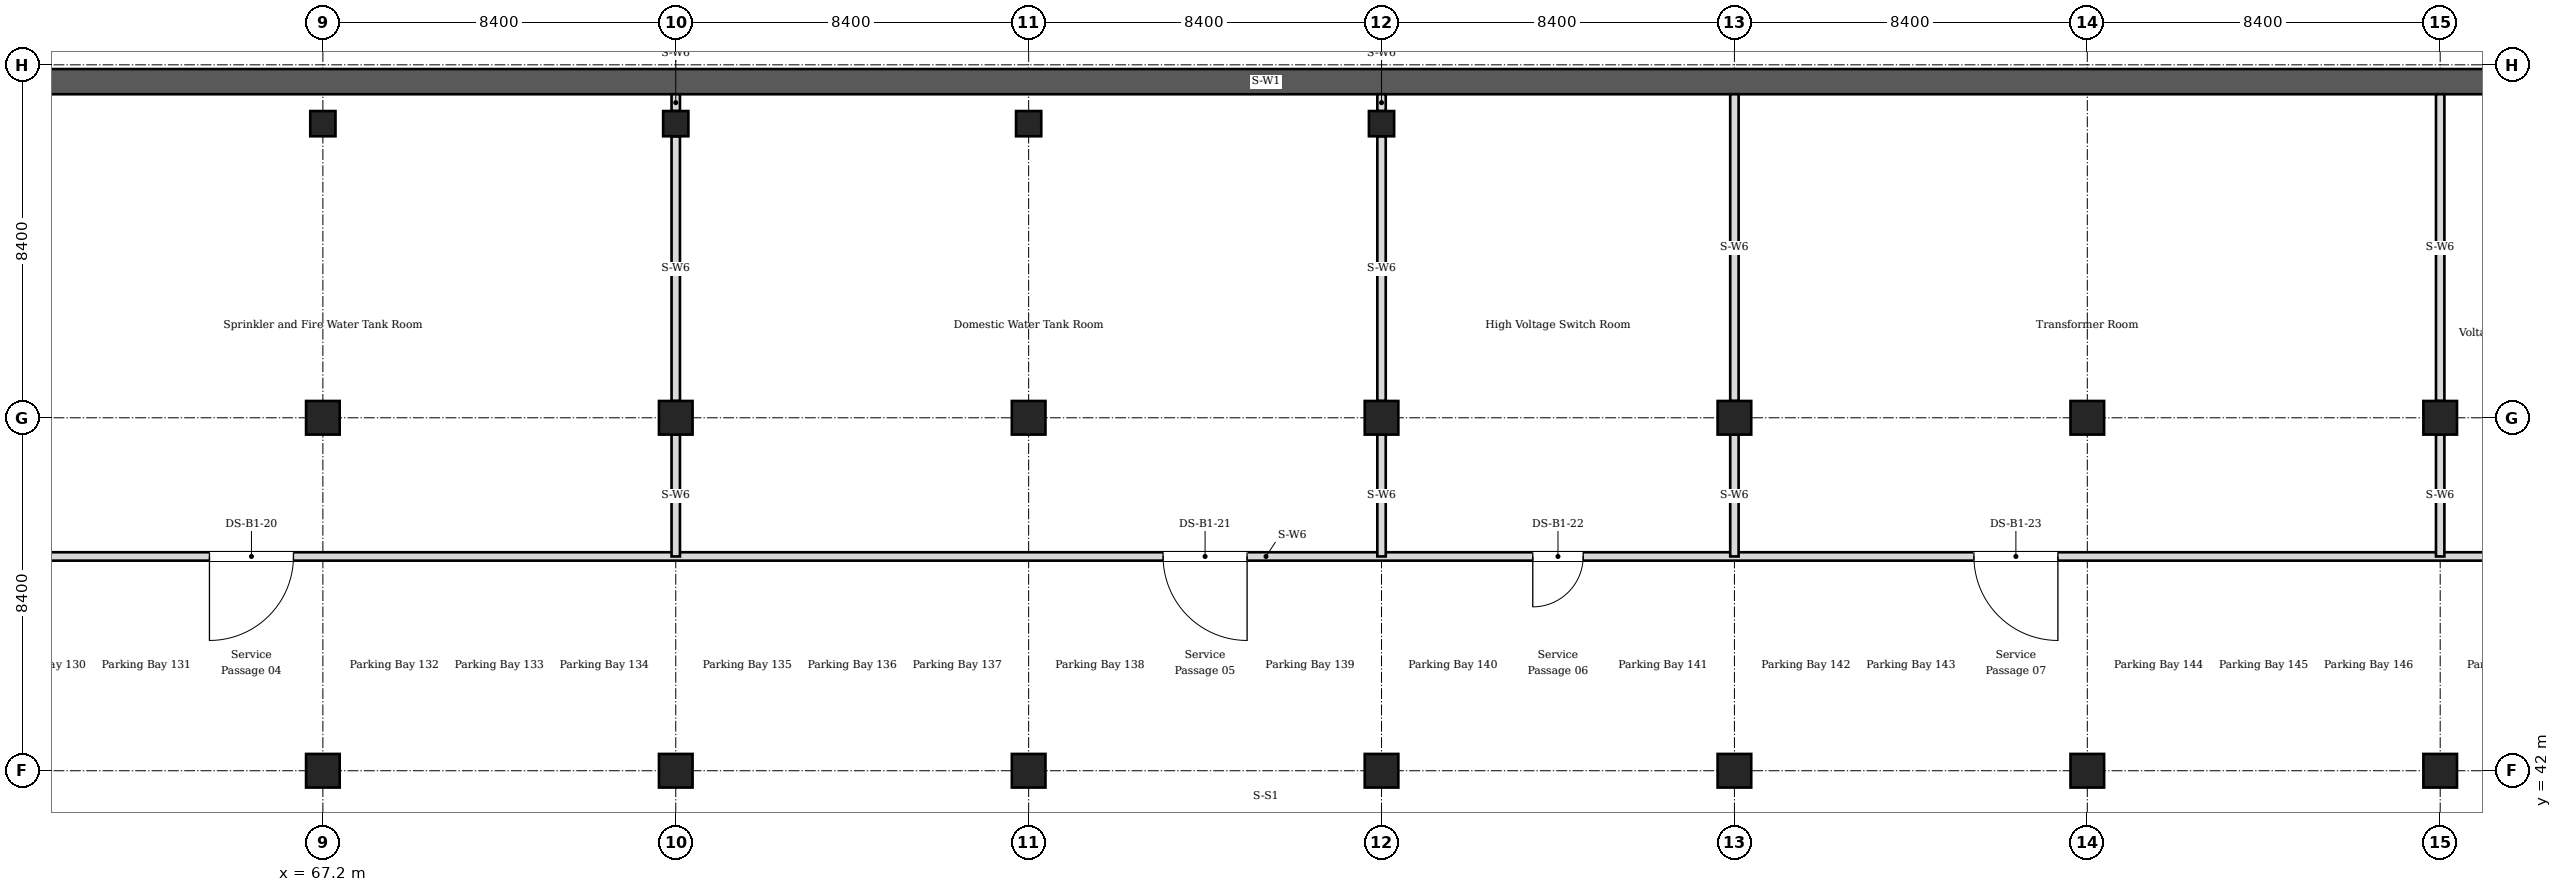
"""IFC4 building model, lengths in metres.
Left out: names, types, materials, properties, quantities, classifications, styles, units other than length and angle.
Written with IfcOpenShell. Run it as: python <this file> out.ifc"""

import sys

from ifc_helpers import new_model, si_unit, direction, frame, frame_2d, origin, origin_2d, place, context, subcontext, project, spatial, rectangle, extrude, element, fill, save


model = new_model("IFC4")
c1 = context("Model", 3, precision=1e-05, world=origin(), true_north=direction((0.0, 1.0)))
c2 = subcontext(c1, "Body", "Model", "MODEL_VIEW")
j1 = project(units=[si_unit("LENGTHUNIT", "METRE"), si_unit("PLANEANGLEUNIT", "RADIAN")], contexts=[c1])
p1 = place(None, origin())
s1 = spatial("IfcSite", under=j1, at=p1, CompositionType="ELEMENT")
p2 = place(p1, origin())
s2 = spatial("IfcBuilding", under=s1, at=p2, CompositionType="ELEMENT")
p3 = place(p2, frame((0.0, 0.0, -5.4)))
s3 = spatial("IfcBuildingStorey", under=s2, at=p3, CompositionType="ELEMENT", Elevation=-5.4)
p4 = place(p3, frame((156.5, 58.4, 0.0), z_axis=(0.0, 0.0, 1.0), x_axis=(-1.0, 0.0, 0.0)))
e1 = element("IfcWall", 1, at=p4, inside=s3, PredefinedType="SOLIDWALL", context=c2, shape_type="SweptSolid", body=[
    extrude(rectangle(XDim=157.1, YDim=0.6, at=frame_2d((78.55, 0.0))), origin(), (0.0, 0.0, 1.0), 4.95),
])
for number, where, z_axis, x_axis in (
    (2, (67.2, 42.0, 0.0), (0.0, 0.0, 1.0), (1.0, 0.0, 0.0)),
    (3, (67.2, 50.4, 0.0), (0.0, 0.0, 1.0), (1.0, 0.0, 0.0)),
    (4, (75.6, 42.0, 0.0), (0.0, 0.0, 1.0), (1.0, 0.0, 0.0)),
    (5, (75.6, 50.4, 0.0), (0.0, 0.0, 1.0), (1.0, 0.0, 0.0)),
    (6, (84.0, 42.0, 0.0), (0.0, 0.0, 1.0), (1.0, 0.0, 0.0)),
    (7, (84.0, 50.4, 0.0), (0.0, 0.0, 1.0), (1.0, 0.0, 0.0)),
    (8, (92.4, 42.0, 0.0), (0.0, 0.0, 1.0), (1.0, 0.0, 0.0)),
    (9, (92.4, 50.4, 0.0), (0.0, 0.0, 1.0), (1.0, 0.0, 0.0)),
    (10, (100.8, 42.0, 0.0), (0.0, 0.0, 1.0), (1.0, 0.0, 0.0)),
    (11, (100.8, 50.4, 0.0), (0.0, 0.0, 1.0), (1.0, 0.0, 0.0)),
    (12, (109.2, 42.0, 0.0), (0.0, 0.0, 1.0), (1.0, 0.0, 0.0)),
    (13, (109.2, 50.4, 0.0), (0.0, 0.0, 1.0), (1.0, 0.0, 0.0)),
    (14, (117.6, 42.0, 0.0), (0.0, 0.0, 1.0), (1.0, 0.0, 0.0)),
    (15, (117.6, 50.4, 0.0), (0.0, 0.0, 1.0), (1.0, 0.0, 0.0)),
):
    element("IfcColumn", number, at=place(p3, frame(where, z_axis=z_axis, x_axis=x_axis)), inside=s3, PredefinedType="COLUMN", context=c2, shape_type="SweptSolid", body=[
        extrude(rectangle(XDim=0.8, YDim=0.8, at=origin_2d()), origin(), (0.0, 0.0, 1.0), 5.4),
    ])
for number, where, z_axis, x_axis in (
    (16, (67.2, 57.4, 0.0), (0.0, 0.0, 1.0), (1.0, 0.0, 0.0)),
    (17, (75.6, 57.4, 0.0), (0.0, 0.0, 1.0), (1.0, 0.0, 0.0)),
    (18, (84.0, 57.4, 0.0), (0.0, 0.0, 1.0), (1.0, 0.0, 0.0)),
    (19, (92.4, 57.4, 0.0), (0.0, 0.0, 1.0), (1.0, 0.0, 0.0)),
):
    element("IfcColumn", number, at=place(p3, frame(where, z_axis=z_axis, x_axis=x_axis)), inside=s3, PredefinedType="COLUMN", context=c2, shape_type="SweptSolid", body=[
        extrude(rectangle(XDim=0.6, YDim=0.6, at=origin_2d()), origin(), (0.0, 0.0, 1.0), 5.4),
    ])
p5 = place(p3, frame((8.4, 47.1, 0.0), z_axis=(0.0, 0.0, 1.0), x_axis=(1.0, 0.0, 0.0)))
e20 = element("IfcWall", 20, at=p5, inside=s3, PredefinedType="PARTITIONING", context=c2, shape_type="SweptSolid", body=[
    extrude(rectangle(XDim=134.4, YDim=0.2, at=frame_2d((67.2, 0.0))), origin(), (0.0, 0.0, 1.0), 4.95),
])
p6 = place(p5, frame((11.6, 0.0, 0.0)))
e21 = element("IfcOpeningElement", 21, at=p6, cuts=e20, PredefinedType="OPENING", context=c2, shape_type="SweptSolid", body=[
    extrude(rectangle(XDim=2.0, YDim=2.4, at=frame_2d((1.0, 1.2))), frame((0.0, 0.11, 0.0), z_axis=(0.0, -1.0, 0.0), x_axis=(1.0, 0.0, 0.0)), (0.0, 0.0, 1.0), 0.22),
])
p7 = place(p5, frame((30.9, 0.0, 0.0)))
e22 = element("IfcOpeningElement", 22, at=p7, cuts=e20, PredefinedType="OPENING", context=c2, shape_type="SweptSolid", body=[
    extrude(rectangle(XDim=2.0, YDim=2.4, at=frame_2d((1.0, 1.2))), frame((0.0, 0.11, 0.0), z_axis=(0.0, -1.0, 0.0), x_axis=(1.0, 0.0, 0.0)), (0.0, 0.0, 1.0), 0.22),
])
p8 = place(p5, frame((45.6, 0.0, 0.0)))
e23 = element("IfcOpeningElement", 23, at=p8, cuts=e20, PredefinedType="OPENING", context=c2, shape_type="SweptSolid", body=[
    extrude(rectangle(XDim=1.2, YDim=2.4, at=frame_2d((0.6, 1.2))), frame((0.0, 0.11, 0.0), z_axis=(0.0, -1.0, 0.0), x_axis=(1.0, 0.0, 0.0)), (0.0, 0.0, 1.0), 0.22),
])
p9 = place(p5, frame((56.1, 0.0, 0.0)))
e24 = element("IfcOpeningElement", 24, at=p9, cuts=e20, PredefinedType="OPENING", context=c2, shape_type="SweptSolid", body=[
    extrude(rectangle(XDim=2.0, YDim=2.4, at=frame_2d((1.0, 1.2))), frame((0.0, 0.11, 0.0), z_axis=(0.0, -1.0, 0.0), x_axis=(1.0, 0.0, 0.0)), (0.0, 0.0, 1.0), 0.22),
])
p10 = place(p5, frame((78.8, 0.0, 0.0)))
e25 = element("IfcOpeningElement", 25, at=p10, cuts=e20, PredefinedType="OPENING", context=c2, shape_type="SweptSolid", body=[
    extrude(rectangle(XDim=2.0, YDim=2.4, at=frame_2d((1.0, 1.2))), frame((0.0, 0.11, 0.0), z_axis=(0.0, -1.0, 0.0), x_axis=(1.0, 0.0, 0.0)), (0.0, 0.0, 1.0), 0.22),
])
p11 = place(p5, frame((87.6, 0.0, 0.0)))
e26 = element("IfcOpeningElement", 26, at=p11, cuts=e20, PredefinedType="OPENING", context=c2, shape_type="SweptSolid", body=[
    extrude(rectangle(XDim=1.2, YDim=2.4, at=frame_2d((0.6, 1.2))), frame((0.0, 0.11, 0.0), z_axis=(0.0, -1.0, 0.0), x_axis=(1.0, 0.0, 0.0)), (0.0, 0.0, 1.0), 0.22),
])
p12 = place(p5, frame((98.1, 0.0, 0.0)))
e27 = element("IfcOpeningElement", 27, at=p12, cuts=e20, PredefinedType="OPENING", context=c2, shape_type="SweptSolid", body=[
    extrude(rectangle(XDim=2.0, YDim=2.4, at=frame_2d((1.0, 1.2))), frame((0.0, 0.11, 0.0), z_axis=(0.0, -1.0, 0.0), x_axis=(1.0, 0.0, 0.0)), (0.0, 0.0, 1.0), 0.22),
])
p13 = place(p5, frame((112.8, 0.0, 0.0)))
e28 = element("IfcOpeningElement", 28, at=p13, cuts=e20, PredefinedType="OPENING", context=c2, shape_type="SweptSolid", body=[
    extrude(rectangle(XDim=1.2, YDim=2.4, at=frame_2d((0.6, 1.2))), frame((0.0, 0.11, 0.0), z_axis=(0.0, -1.0, 0.0), x_axis=(1.0, 0.0, 0.0)), (0.0, 0.0, 1.0), 0.22),
])
p14 = place(p5, frame((123.3, 0.0, 0.0)))
e29 = element("IfcOpeningElement", 29, at=p14, cuts=e20, PredefinedType="OPENING", context=c2, shape_type="SweptSolid", body=[
    extrude(rectangle(XDim=2.0, YDim=2.4, at=frame_2d((1.0, 1.2))), frame((0.0, 0.11, 0.0), z_axis=(0.0, -1.0, 0.0), x_axis=(1.0, 0.0, 0.0)), (0.0, 0.0, 1.0), 0.22),
])
p15 = place(p3, frame((75.6, 47.1, 0.0), z_axis=(0.0, 0.0, 1.0), x_axis=(0.0, 1.0, 0.0)))
e30 = element("IfcWall", 30, at=p15, inside=s3, PredefinedType="PARTITIONING", context=c2, shape_type="SweptSolid", body=[
    extrude(rectangle(XDim=2.9, YDim=0.2, at=frame_2d((1.45, 0.0))), origin(), (0.0, 0.0, 1.0), 4.95),
])
p16 = place(p3, frame((75.6, 50.8, 0.0), z_axis=(0.0, 0.0, 1.0), x_axis=(0.0, 1.0, 0.0)))
e31 = element("IfcWall", 31, at=p16, inside=s3, PredefinedType="PARTITIONING", context=c2, shape_type="SweptSolid", body=[
    extrude(rectangle(XDim=6.3, YDim=0.2, at=frame_2d((3.15, 0.0))), origin(), (0.0, 0.0, 1.0), 4.95),
])
p17 = place(p3, frame((75.6, 57.7, 0.0), z_axis=(0.0, 0.0, 1.0), x_axis=(0.0, 1.0, 0.0)))
e32 = element("IfcWall", 32, at=p17, inside=s3, PredefinedType="PARTITIONING", context=c2, shape_type="SweptSolid", body=[
    extrude(rectangle(XDim=0.4, YDim=0.2, at=frame_2d((0.2, 0.0))), origin(), (0.0, 0.0, 1.0), 4.95),
])
p18 = place(p3, frame((92.4, 47.1, 0.0), z_axis=(0.0, 0.0, 1.0), x_axis=(0.0, 1.0, 0.0)))
e33 = element("IfcWall", 33, at=p18, inside=s3, PredefinedType="PARTITIONING", context=c2, shape_type="SweptSolid", body=[
    extrude(rectangle(XDim=2.9, YDim=0.2, at=frame_2d((1.45, 0.0))), origin(), (0.0, 0.0, 1.0), 4.95),
])
p19 = place(p3, frame((92.4, 50.8, 0.0), z_axis=(0.0, 0.0, 1.0), x_axis=(0.0, 1.0, 0.0)))
e34 = element("IfcWall", 34, at=p19, inside=s3, PredefinedType="PARTITIONING", context=c2, shape_type="SweptSolid", body=[
    extrude(rectangle(XDim=6.3, YDim=0.2, at=frame_2d((3.15, 0.0))), origin(), (0.0, 0.0, 1.0), 4.95),
])
p20 = place(p3, frame((92.4, 57.7, 0.0), z_axis=(0.0, 0.0, 1.0), x_axis=(0.0, 1.0, 0.0)))
e35 = element("IfcWall", 35, at=p20, inside=s3, PredefinedType="PARTITIONING", context=c2, shape_type="SweptSolid", body=[
    extrude(rectangle(XDim=0.4, YDim=0.2, at=frame_2d((0.2, 0.0))), origin(), (0.0, 0.0, 1.0), 4.95),
])
p21 = place(p3, frame((100.8, 47.1, 0.0), z_axis=(0.0, 0.0, 1.0), x_axis=(0.0, 1.0, 0.0)))
e36 = element("IfcWall", 36, at=p21, inside=s3, PredefinedType="PARTITIONING", context=c2, shape_type="SweptSolid", body=[
    extrude(rectangle(XDim=2.9, YDim=0.2, at=frame_2d((1.45, 0.0))), origin(), (0.0, 0.0, 1.0), 4.95),
])
p22 = place(p3, frame((100.8, 50.8, 0.0), z_axis=(0.0, 0.0, 1.0), x_axis=(0.0, 1.0, 0.0)))
e37 = element("IfcWall", 37, at=p22, inside=s3, PredefinedType="PARTITIONING", context=c2, shape_type="SweptSolid", body=[
    extrude(rectangle(XDim=7.3, YDim=0.2, at=frame_2d((3.65, 0.0))), origin(), (0.0, 0.0, 1.0), 4.95),
])
p23 = place(p3, frame((117.6, 47.1, 0.0), z_axis=(0.0, 0.0, 1.0), x_axis=(0.0, 1.0, 0.0)))
e38 = element("IfcWall", 38, at=p23, inside=s3, PredefinedType="PARTITIONING", context=c2, shape_type="SweptSolid", body=[
    extrude(rectangle(XDim=2.9, YDim=0.2, at=frame_2d((1.45, 0.0))), origin(), (0.0, 0.0, 1.0), 4.95),
])
p24 = place(p3, frame((117.6, 50.8, 0.0), z_axis=(0.0, 0.0, 1.0), x_axis=(0.0, 1.0, 0.0)))
e39 = element("IfcWall", 39, at=p24, inside=s3, PredefinedType="PARTITIONING", context=c2, shape_type="SweptSolid", body=[
    extrude(rectangle(XDim=7.3, YDim=0.2, at=frame_2d((3.65, 0.0))), origin(), (0.0, 0.0, 1.0), 4.95),
])
p25 = place(p9, origin())
e40 = element("IfcDoor", 40, at=p25, inside=s3, OperationType="DOUBLE_DOOR_SINGLE_SWING", PredefinedType="DOOR", context=c2, shape_type="SweptSolid", body=[
    extrude(rectangle(XDim=2.0, YDim=2.4, at=frame_2d((1.0, 1.2))), frame((0.0, 0.025, 0.0), z_axis=(0.0, -1.0, 0.0), x_axis=(1.0, 0.0, 0.0)), (0.0, 0.0, 1.0), 0.05),
])
fill(e24, e40)
p26 = place(p10, origin())
e41 = element("IfcDoor", 41, at=p26, inside=s3, OperationType="DOUBLE_DOOR_SINGLE_SWING", PredefinedType="DOOR", context=c2, shape_type="SweptSolid", body=[
    extrude(rectangle(XDim=2.0, YDim=2.4, at=frame_2d((1.0, 1.2))), frame((0.0, 0.025, 0.0), z_axis=(0.0, -1.0, 0.0), x_axis=(1.0, 0.0, 0.0)), (0.0, 0.0, 1.0), 0.05),
])
fill(e25, e41)
p27 = place(p11, origin())
e42 = element("IfcDoor", 42, at=p27, inside=s3, OperationType="SINGLE_SWING_LEFT", PredefinedType="DOOR", context=c2, shape_type="SweptSolid", body=[
    extrude(rectangle(XDim=1.2, YDim=2.4, at=frame_2d((0.6, 1.2))), frame((0.0, 0.025, 0.0), z_axis=(0.0, -1.0, 0.0), x_axis=(1.0, 0.0, 0.0)), (0.0, 0.0, 1.0), 0.05),
])
fill(e26, e42)
p28 = place(p12, origin())
e43 = element("IfcDoor", 43, at=p28, inside=s3, OperationType="DOUBLE_DOOR_SINGLE_SWING", PredefinedType="DOOR", context=c2, shape_type="SweptSolid", body=[
    extrude(rectangle(XDim=2.0, YDim=2.4, at=frame_2d((1.0, 1.2))), frame((0.0, 0.025, 0.0), z_axis=(0.0, -1.0, 0.0), x_axis=(1.0, 0.0, 0.0)), (0.0, 0.0, 1.0), 0.05),
])
fill(e27, e43)
save(model, sys.argv[1])
